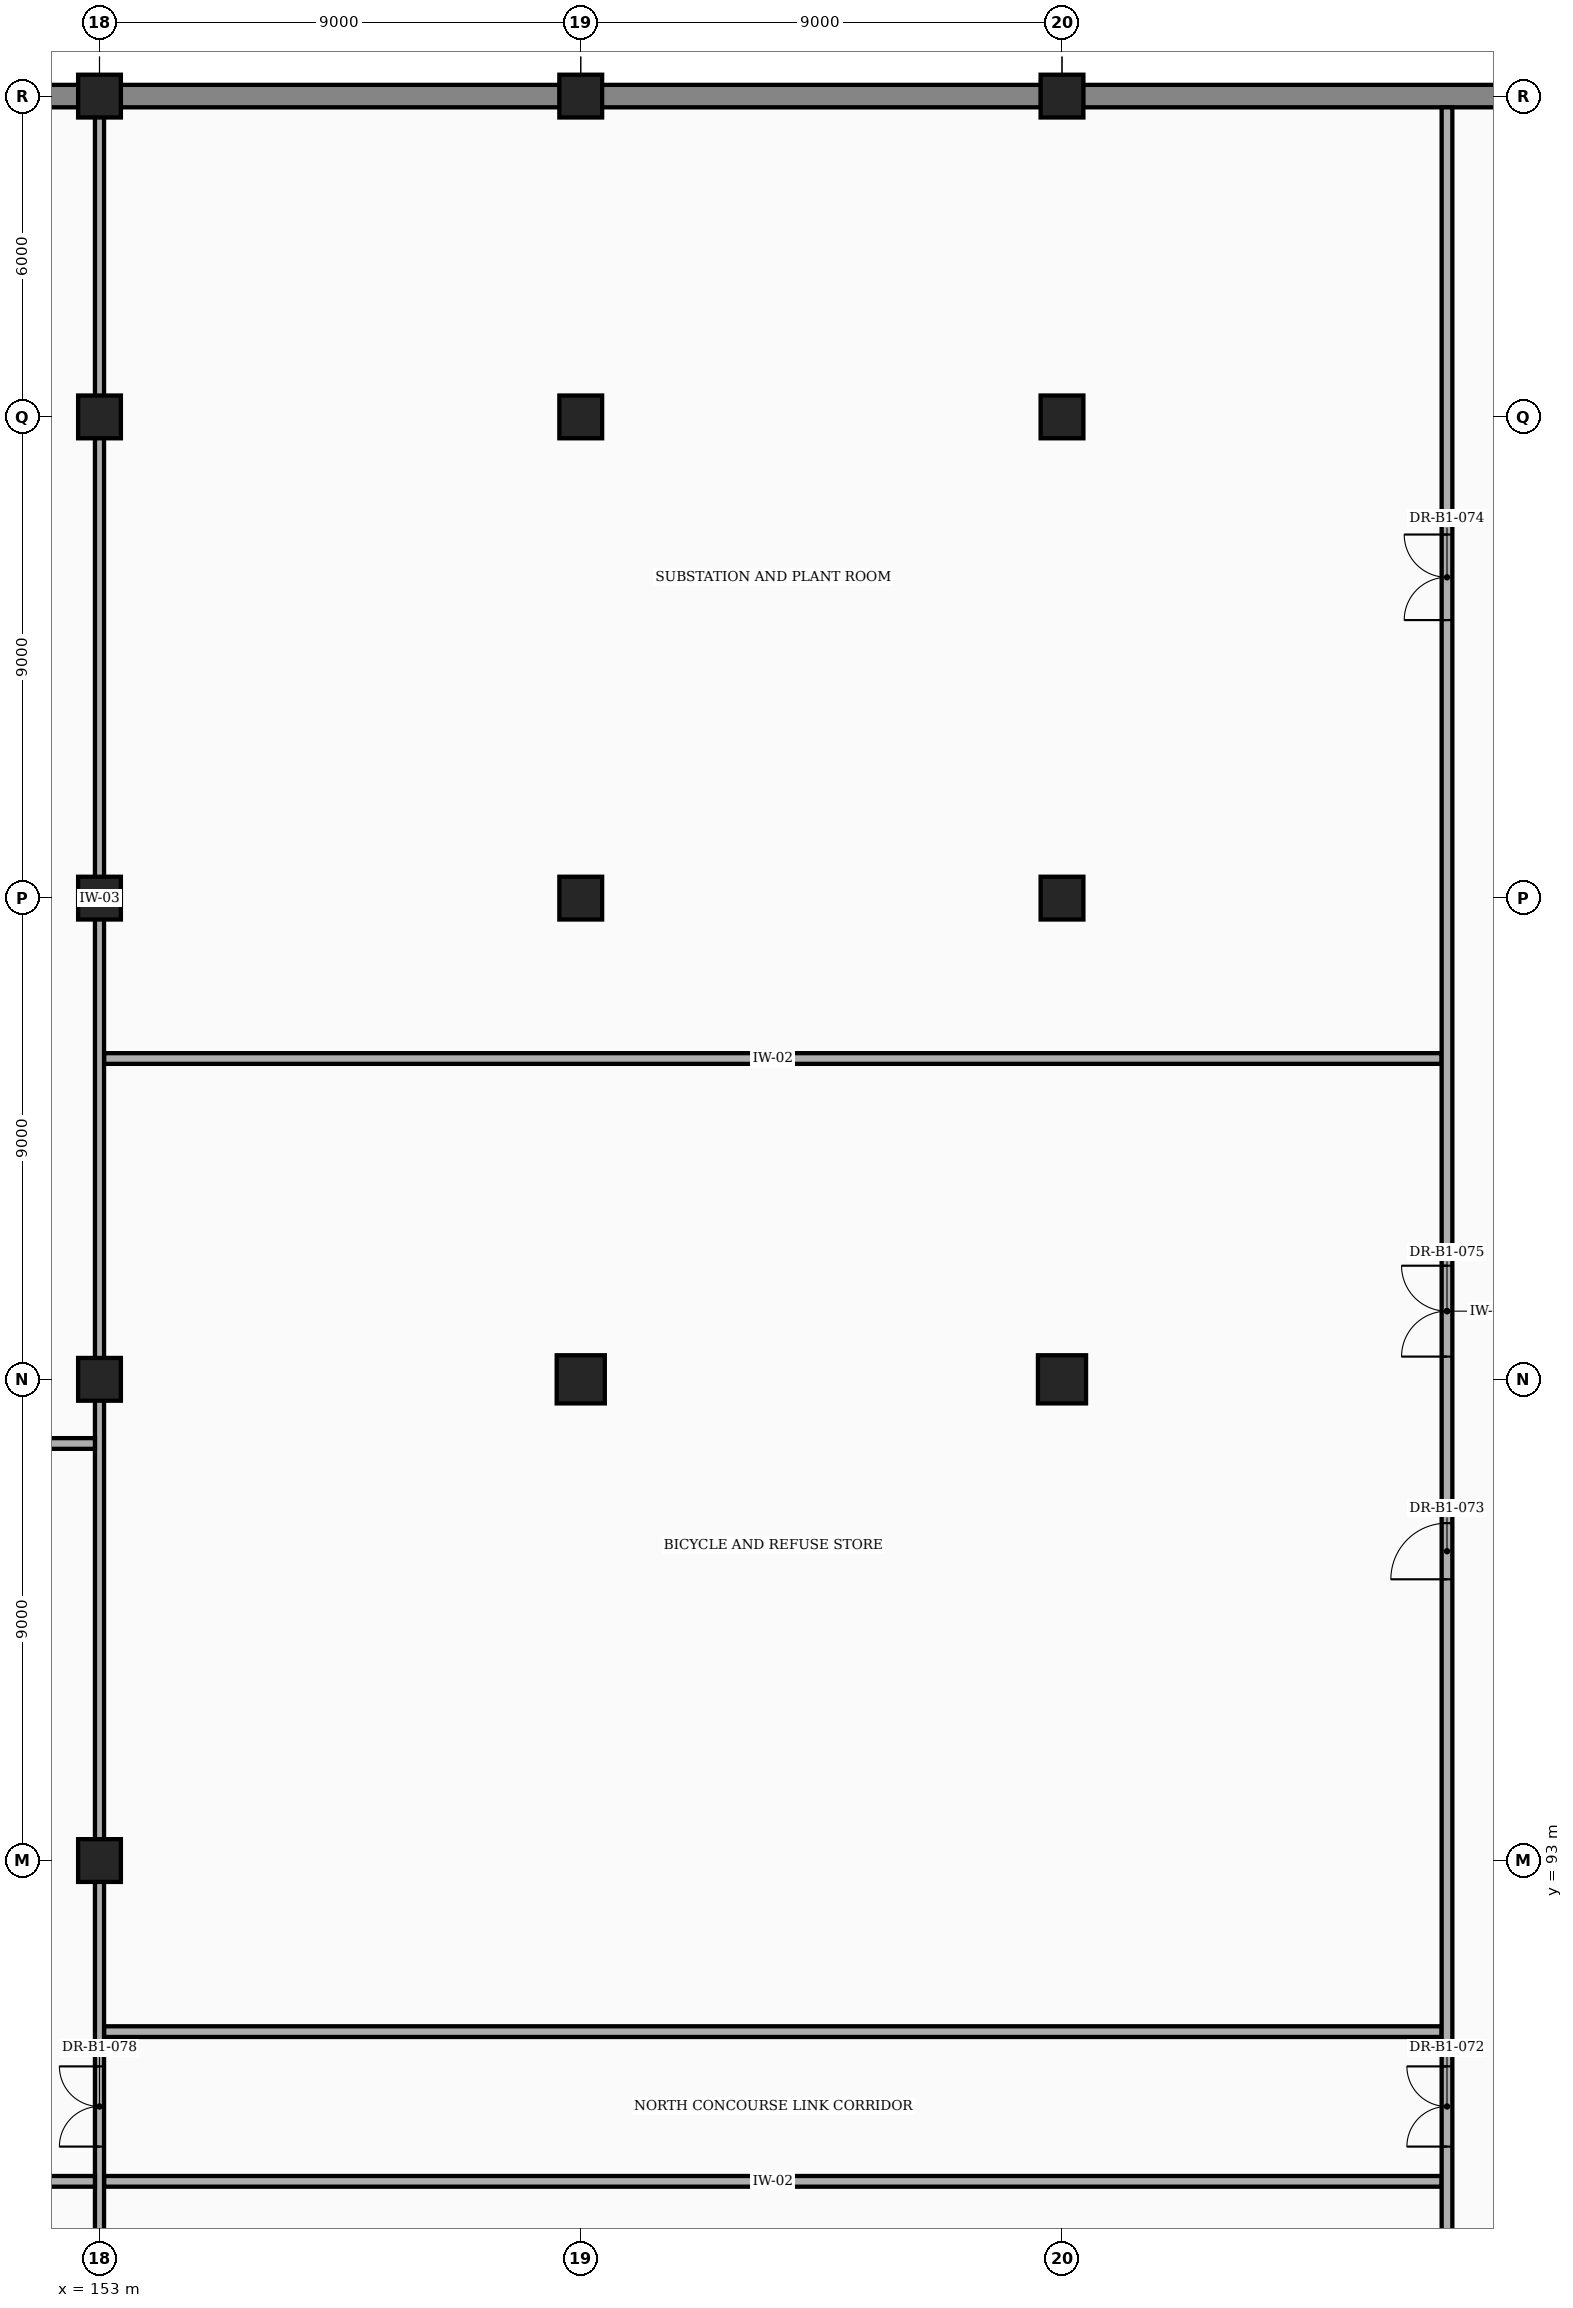
"""IFC4 building model, lengths in metres.
Left out: names, types, materials, properties, quantities, classifications, styles, units other than length and angle.
Written with IfcOpenShell. Run it as: python <this file> out.ifc"""

import sys

from ifc_helpers import new_model, si_unit, direction, frame, frame_2d, origin, origin_2d, place, context, subcontext, project, spatial, rectangle, extrude, element, fill, save


model = new_model("IFC4")
c1 = context("Model", 3, precision=1e-05, world=origin(), true_north=direction((0.0, 1.0)))
c2 = subcontext(c1, "Body", "Model", "MODEL_VIEW")
j1 = project(units=[si_unit("LENGTHUNIT", "METRE"), si_unit("PLANEANGLEUNIT", "RADIAN")], contexts=[c1])
p1 = place(None, origin())
s1 = spatial("IfcSite", under=j1, at=p1, CompositionType="ELEMENT")
p2 = place(p1, origin())
s2 = spatial("IfcBuilding", under=s1, at=p2, CompositionType="ELEMENT")
p3 = place(p2, frame((0.0, 0.0, -4.5)))
s3 = spatial("IfcBuildingStorey", under=s2, at=p3, CompositionType="ELEMENT", Elevation=-4.5)
for number, where, z_axis, x_axis in (
    (1, (153.0, 93.0, -0.45), (0.0, 0.0, 1.0), (1.0, 0.0, 0.0)),
    (2, (153.0, 102.0, -0.45), (0.0, 0.0, 1.0), (1.0, 0.0, 0.0)),
    (3, (153.0, 111.0, -0.45), (0.0, 0.0, 1.0), (1.0, 0.0, 0.0)),
    (4, (153.0, 120.0, -0.45), (0.0, 0.0, 1.0), (1.0, 0.0, 0.0)),
    (5, (153.0, 126.0, -0.45), (0.0, 0.0, 1.0), (1.0, 0.0, 0.0)),
):
    element("IfcColumn", number, at=place(p3, frame(where, z_axis=z_axis, x_axis=x_axis)), inside=s3, PredefinedType="COLUMN", context=c2, shape_type="SweptSolid", body=[
        extrude(rectangle(XDim=0.8, YDim=0.8, at=origin_2d()), origin(), (0.0, 0.0, 1.0), 4.95),
    ])
p4 = place(p3, frame((162.0, 102.0, -0.45), z_axis=(0.0, 0.0, 1.0), x_axis=(1.0, 0.0, 0.0)))
e6 = element("IfcColumn", 6, at=p4, inside=s3, PredefinedType="COLUMN", context=c2, shape_type="SweptSolid", body=[
    extrude(rectangle(XDim=0.9, YDim=0.9, at=origin_2d()), origin(), (0.0, 0.0, 1.0), 4.95),
])
for number, where, z_axis, x_axis in (
    (7, (162.0, 111.0, -0.45), (0.0, 0.0, 1.0), (1.0, 0.0, 0.0)),
    (8, (162.0, 120.0, -0.45), (0.0, 0.0, 1.0), (1.0, 0.0, 0.0)),
    (9, (162.0, 126.0, -0.45), (0.0, 0.0, 1.0), (1.0, 0.0, 0.0)),
):
    element("IfcColumn", number, at=place(p3, frame(where, z_axis=z_axis, x_axis=x_axis)), inside=s3, PredefinedType="COLUMN", context=c2, shape_type="SweptSolid", body=[
        extrude(rectangle(XDim=0.8, YDim=0.8, at=origin_2d()), origin(), (0.0, 0.0, 1.0), 4.95),
    ])
p5 = place(p3, frame((171.0, 102.0, -0.45), z_axis=(0.0, 0.0, 1.0), x_axis=(1.0, 0.0, 0.0)))
e10 = element("IfcColumn", 10, at=p5, inside=s3, PredefinedType="COLUMN", context=c2, shape_type="SweptSolid", body=[
    extrude(rectangle(XDim=0.9, YDim=0.9, at=origin_2d()), origin(), (0.0, 0.0, 1.0), 4.95),
])
for number, where, z_axis, x_axis in (
    (11, (171.0, 111.0, -0.45), (0.0, 0.0, 1.0), (1.0, 0.0, 0.0)),
    (12, (171.0, 120.0, -0.45), (0.0, 0.0, 1.0), (1.0, 0.0, 0.0)),
    (13, (171.0, 126.0, -0.45), (0.0, 0.0, 1.0), (1.0, 0.0, 0.0)),
):
    element("IfcColumn", number, at=place(p3, frame(where, z_axis=z_axis, x_axis=x_axis)), inside=s3, PredefinedType="COLUMN", context=c2, shape_type="SweptSolid", body=[
        extrude(rectangle(XDim=0.8, YDim=0.8, at=origin_2d()), origin(), (0.0, 0.0, 1.0), 4.95),
    ])
p6 = place(p3, frame((135.392, 126.0, 0.0), z_axis=(0.0, 0.0, 1.0), x_axis=(1.0, 0.0, 0.0)))
e14 = element("IfcWall", 14, at=p6, inside=s3, PredefinedType="STANDARD", context=c2, shape_type="SweptSolid", body=[
    extrude(rectangle(XDim=17.216, YDim=0.42, at=frame_2d((8.608, 0.0))), origin(), (0.0, 0.0, 1.0), 3.7),
])
for number, where, z_axis, x_axis in (
    (15, (153.392, 126.0, 0.0), (0.0, 0.0, 1.0), (1.0, 0.0, 0.0)),
    (16, (162.392, 126.0, 0.0), (0.0, 0.0, 1.0), (1.0, 0.0, 0.0)),
):
    element("IfcWall", number, at=place(p3, frame(where, z_axis=z_axis, x_axis=x_axis)), inside=s3, PredefinedType="STANDARD", context=c2, shape_type="SweptSolid", body=[
        extrude(rectangle(XDim=8.216, YDim=0.42, at=frame_2d((4.108, 0.0))), origin(), (0.0, 0.0, 1.0), 3.7),
    ])
p7 = place(p3, frame((171.392, 126.0, 0.0), z_axis=(0.0, 0.0, 1.0), x_axis=(1.0, 0.0, 0.0)))
e17 = element("IfcWall", 17, at=p7, inside=s3, PredefinedType="STANDARD", context=c2, shape_type="SweptSolid", body=[
    extrude(rectangle(XDim=17.216, YDim=0.42, at=frame_2d((8.608, 0.0))), origin(), (0.0, 0.0, 1.0), 3.7),
])
for number, where, z_axis, x_axis in (
    (18, (153.085, 87.0, 0.0), (0.0, 0.0, 1.0), (1.0, 0.0, 0.0)),
    (19, (153.085, 89.8, 0.0), (0.0, 0.0, 1.0), (1.0, 0.0, 0.0)),
    (20, (153.085, 108.0, 0.0), (0.0, 0.0, 1.0), (1.0, 0.0, 0.0)),
):
    element("IfcWall", number, at=place(p3, frame(where, z_axis=z_axis, x_axis=x_axis)), inside=s3, PredefinedType="PARTITIONING", context=c2, shape_type="SweptSolid", body=[
        extrude(rectangle(XDim=25.015, YDim=0.2, at=frame_2d((12.508, 0.0))), origin(), (0.0, 0.0, 1.0), 4.24),
    ])
p8 = place(p3, frame((178.2, 80.76, 0.0), z_axis=(0.0, 0.0, 1.0), x_axis=(0.0, 1.0, 0.0)))
e21 = element("IfcWall", 21, at=p8, inside=s3, PredefinedType="PARTITIONING", context=c2, shape_type="SweptSolid", body=[
    extrude(rectangle(XDim=45.03, YDim=0.2, at=frame_2d((22.515, 0.0))), origin(), (0.0, 0.0, 1.0), 4.24),
])
p9 = place(p8, frame((6.89, 0.0, 0.0)))
e22 = element("IfcOpeningElement", 22, at=p9, cuts=e21, PredefinedType="OPENING", context=c2, shape_type="SweptSolid", body=[
    extrude(rectangle(XDim=1.5, YDim=2.2, at=frame_2d((0.75, 1.1))), frame((0.0, 0.112, 0.0), z_axis=(0.0, -1.0, 0.0), x_axis=(1.0, 0.0, 0.0)), (0.0, 0.0, 1.0), 0.224),
])
p10 = place(p8, frame((17.5, 0.0, 0.0)))
e23 = element("IfcOpeningElement", 23, at=p10, cuts=e21, PredefinedType="OPENING", context=c2, shape_type="SweptSolid", body=[
    extrude(rectangle(XDim=1.05, YDim=2.15, at=frame_2d((0.525, 1.075))), frame((0.0, 0.112, 0.0), z_axis=(0.0, -1.0, 0.0), x_axis=(1.0, 0.0, 0.0)), (0.0, 0.0, 1.0), 0.224),
])
p11 = place(p8, frame((35.44, 0.0, 0.0)))
e24 = element("IfcOpeningElement", 24, at=p11, cuts=e21, PredefinedType="OPENING", context=c2, shape_type="SweptSolid", body=[
    extrude(rectangle(XDim=1.6, YDim=2.3, at=frame_2d((0.8, 1.15))), frame((0.0, 0.112, 0.0), z_axis=(0.0, -1.0, 0.0), x_axis=(1.0, 0.0, 0.0)), (0.0, 0.0, 1.0), 0.224),
])
p12 = place(p8, frame((21.665, 0.0, 0.0)))
e25 = element("IfcOpeningElement", 25, at=p12, cuts=e21, PredefinedType="OPENING", context=c2, shape_type="SweptSolid", body=[
    extrude(rectangle(XDim=1.7, YDim=2.3, at=frame_2d((0.85, 1.15))), frame((0.0, 0.112, 0.0), z_axis=(0.0, -1.0, 0.0), x_axis=(1.0, 0.0, 0.0)), (0.0, 0.0, 1.0), 0.224),
])
p13 = place(p8, frame((0.3, 0.0, 0.0)))
e26 = element("IfcOpeningElement", 26, at=p13, cuts=e21, PredefinedType="OPENING", context=c2, shape_type="SweptSolid", body=[
    extrude(rectangle(XDim=1.7, YDim=2.3, at=frame_2d((0.85, 1.15))), frame((0.0, 0.112, 0.0), z_axis=(0.0, -1.0, 0.0), x_axis=(1.0, 0.0, 0.0)), (0.0, 0.0, 1.0), 0.224),
])
p14 = place(p3, frame((153.0, 84.22, 0.0), z_axis=(0.0, 0.0, 1.0), x_axis=(0.0, 1.0, 0.0)))
e27 = element("IfcWall", 27, at=p14, inside=s3, PredefinedType="PARTITIONING", context=c2, shape_type="SweptSolid", body=[
    extrude(rectangle(XDim=8.56, YDim=0.17, at=frame_2d((4.28, 0.0))), origin(), (0.0, 0.0, 1.0), 3.667),
])
p15 = place(p14, frame((3.43, 0.0, 0.0)))
e28 = element("IfcOpeningElement", 28, at=p15, cuts=e27, PredefinedType="OPENING", context=c2, shape_type="SweptSolid", body=[
    extrude(rectangle(XDim=1.5, YDim=2.2, at=frame_2d((0.75, 1.1))), frame((0.0, 0.097, 0.0), z_axis=(0.0, -1.0, 0.0), x_axis=(1.0, 0.0, 0.0)), (0.0, 0.0, 1.0), 0.194),
])
p16 = place(p3, frame((153.0, 93.22, 0.0), z_axis=(0.0, 0.0, 1.0), x_axis=(0.0, 1.0, 0.0)))
e29 = element("IfcWall", 29, at=p16, inside=s3, PredefinedType="PARTITIONING", context=c2, shape_type="SweptSolid", body=[
    extrude(rectangle(XDim=8.56, YDim=0.17, at=frame_2d((4.28, 0.0))), origin(), (0.0, 0.0, 1.0), 3.667),
])
p17 = place(p3, frame((153.0, 102.22, 0.0), z_axis=(0.0, 0.0, 1.0), x_axis=(0.0, 1.0, 0.0)))
e30 = element("IfcWall", 30, at=p17, inside=s3, PredefinedType="PARTITIONING", context=c2, shape_type="SweptSolid", body=[
    extrude(rectangle(XDim=17.56, YDim=0.17, at=frame_2d((8.78, 0.0))), origin(), (0.0, 0.0, 1.0), 3.667),
])
p18 = place(p3, frame((153.0, 120.22, 0.0), z_axis=(0.0, 0.0, 1.0), x_axis=(0.0, 1.0, 0.0)))
e31 = element("IfcWall", 31, at=p18, inside=s3, PredefinedType="PARTITIONING", context=c2, shape_type="SweptSolid", body=[
    extrude(rectangle(XDim=5.56, YDim=0.17, at=frame_2d((2.78, 0.0))), origin(), (0.0, 0.0, 1.0), 3.709),
])
p19 = place(p3, frame((45.085, 87.0, 0.0), z_axis=(0.0, 0.0, 1.0), x_axis=(1.0, 0.0, 0.0)))
e32 = element("IfcWall", 32, at=p19, inside=s3, PredefinedType="PARTITIONING", context=c2, shape_type="SweptSolid", body=[
    extrude(rectangle(XDim=107.83, YDim=0.2, at=frame_2d((53.915, 0.0))), origin(), (0.0, 0.0, 1.0), 4.24),
])
p20 = place(p19, frame((36.0, 0.0, 0.0)))
e33 = element("IfcOpeningElement", 33, at=p20, cuts=e32, PredefinedType="OPENING", context=c2, shape_type="SweptSolid", body=[
    extrude(rectangle(XDim=1.6, YDim=2.3, at=frame_2d((0.8, 1.15))), frame((0.0, 0.112, 0.0), z_axis=(0.0, -1.0, 0.0), x_axis=(1.0, 0.0, 0.0)), (0.0, 0.0, 1.0), 0.224),
])
p21 = place(p19, frame((92.0, 0.0, 0.0)))
e34 = element("IfcOpeningElement", 34, at=p21, cuts=e32, PredefinedType="OPENING", context=c2, shape_type="SweptSolid", body=[
    extrude(rectangle(XDim=1.8, YDim=2.5, at=frame_2d((0.9, 1.25))), frame((0.0, 0.112, 0.0), z_axis=(0.0, -1.0, 0.0), x_axis=(1.0, 0.0, 0.0)), (0.0, 0.0, 1.0), 0.224),
])
p22 = place(p3, frame((147.06, 100.8, 0.0), z_axis=(0.0, 0.0, 1.0), x_axis=(1.0, 0.0, 0.0)))
e35 = element("IfcWall", 35, at=p22, inside=s3, PredefinedType="PARTITIONING", context=c2, shape_type="SweptSolid", body=[
    extrude(rectangle(XDim=5.855, YDim=0.2, at=frame_2d((2.927, 0.0))), origin(), (0.0, 0.0, 1.0), 4.24),
])
p23 = place(p9, origin())
e36 = element("IfcDoor", 36, at=p23, inside=s3, OperationType="DOUBLE_DOOR_SINGLE_SWING", PredefinedType="DOOR", context=c2, shape_type="SweptSolid", body=[
    extrude(rectangle(XDim=1.5, YDim=2.2, at=frame_2d((0.75, 1.1))), frame((0.0, 0.025, 0.0), z_axis=(0.0, -1.0, 0.0), x_axis=(1.0, 0.0, 0.0)), (0.0, 0.0, 1.0), 0.05),
])
fill(e22, e36)
p24 = place(p10, origin())
e37 = element("IfcDoor", 37, at=p24, inside=s3, OperationType="SINGLE_SWING_LEFT", PredefinedType="DOOR", context=c2, shape_type="SweptSolid", body=[
    extrude(rectangle(XDim=1.05, YDim=2.15, at=frame_2d((0.525, 1.075))), frame((0.0, 0.025, 0.0), z_axis=(0.0, -1.0, 0.0), x_axis=(1.0, 0.0, 0.0)), (0.0, 0.0, 1.0), 0.05),
])
fill(e23, e37)
p25 = place(p11, origin())
e38 = element("IfcDoor", 38, at=p25, inside=s3, OperationType="DOUBLE_DOOR_SINGLE_SWING", PredefinedType="DOOR", context=c2, shape_type="SweptSolid", body=[
    extrude(rectangle(XDim=1.6, YDim=2.3, at=frame_2d((0.8, 1.15))), frame((0.0, 0.025, 0.0), z_axis=(0.0, -1.0, 0.0), x_axis=(1.0, 0.0, 0.0)), (0.0, 0.0, 1.0), 0.05),
])
fill(e24, e38)
p26 = place(p12, origin())
e39 = element("IfcDoor", 39, at=p26, inside=s3, OperationType="DOUBLE_DOOR_SINGLE_SWING", PredefinedType="DOOR", context=c2, shape_type="SweptSolid", body=[
    extrude(rectangle(XDim=1.7, YDim=2.3, at=frame_2d((0.85, 1.15))), frame((0.0, 0.025, 0.0), z_axis=(0.0, -1.0, 0.0), x_axis=(1.0, 0.0, 0.0)), (0.0, 0.0, 1.0), 0.05),
])
fill(e25, e39)
p27 = place(p15, origin())
e40 = element("IfcDoor", 40, at=p27, inside=s3, OperationType="DOUBLE_DOOR_SINGLE_SWING", PredefinedType="DOOR", context=c2, shape_type="SweptSolid", body=[
    extrude(rectangle(XDim=1.5, YDim=2.2, at=frame_2d((0.75, 1.1))), frame((0.0, 0.025, 0.0), z_axis=(0.0, -1.0, 0.0), x_axis=(1.0, 0.0, 0.0)), (0.0, 0.0, 1.0), 0.05),
])
fill(e28, e40)
save(model, sys.argv[1])
